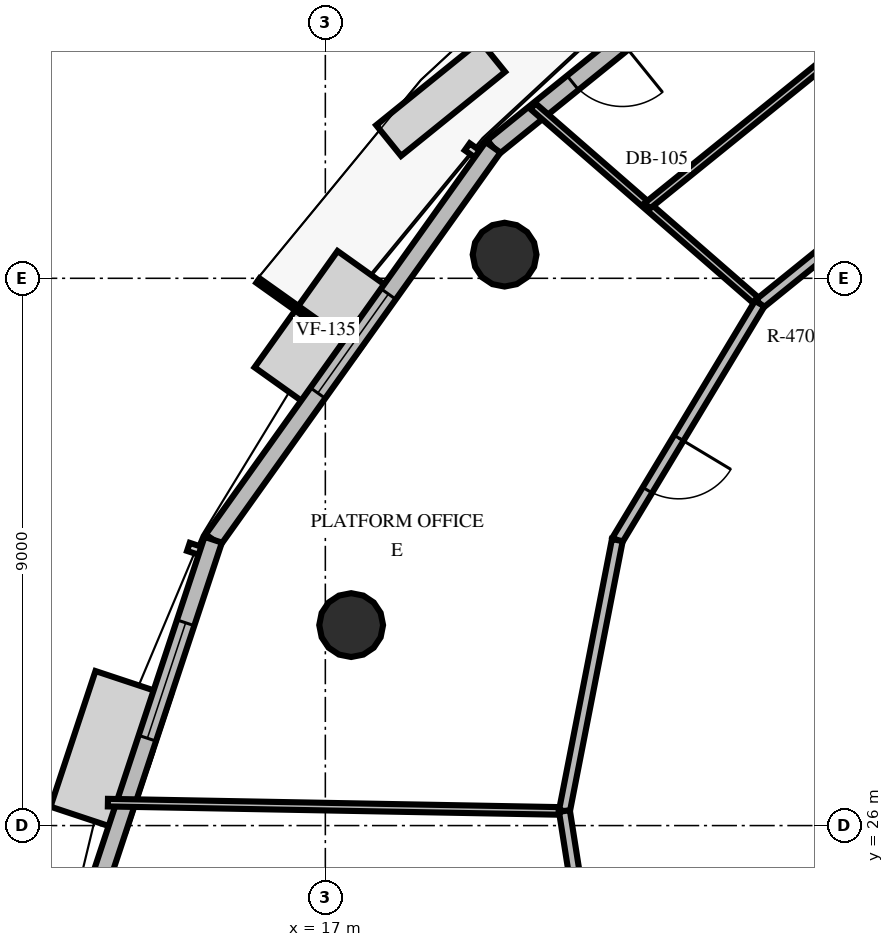
"""IFC4 building model, lengths in metres.
Left out: names, types, materials, properties, quantities, classifications, styles, units other than length and angle.
Written with IfcOpenShell. Run it as: python <this file> out.ifc"""

import sys

from ifc_helpers import new_model, si_unit, direction, frame, frame_2d, origin, origin_2d, place, context, subcontext, project, spatial, rectangle, circle, extrude, element, fill, save


model = new_model("IFC4")
c1 = context("Model", 3, precision=1e-05, world=origin(), true_north=direction((0.0, 1.0)))
c2 = subcontext(c1, "Body", "Model", "MODEL_VIEW")
j1 = project(units=[si_unit("LENGTHUNIT", "METRE"), si_unit("PLANEANGLEUNIT", "RADIAN")], contexts=[c1])
p1 = place(None, origin())
s1 = spatial("IfcSite", under=j1, at=p1, CompositionType="ELEMENT")
p2 = place(p1, origin())
s2 = spatial("IfcBuilding", under=s1, at=p2, CompositionType="ELEMENT")
p3 = place(p2, frame((0.0, 0.0, 195.2)))
s3 = spatial("IfcBuildingStorey", under=s2, at=p3, CompositionType="ELEMENT", Elevation=195.2)
for number, where, z_axis, x_axis in (
    (1, (19.948, 35.389, 0.0), (0.0, 0.0, 1.0), (1.0, 0.0, 0.0)),
    (2, (17.425, 29.297, 0.0), (0.0, 0.0, 1.0), (1.0, 0.0, 0.0)),
):
    element("IfcColumn", number, at=place(p3, frame(where, z_axis=z_axis, x_axis=x_axis)), inside=s3, PredefinedType="COLUMN", context=c2, shape_type="SweptSolid", body=[
        extrude(circle(Radius=0.525, at=origin_2d()), origin(), (0.0, 0.0, 1.0), 3.6),
    ])
p4 = place(p3, frame((26.078, 42.264, 0.0), z_axis=(0.0, 0.0, 1.0), x_axis=(-0.777687524657, -0.628651027194, 0.0)))
e3 = element("IfcWall", 3, at=p4, inside=s3, PredefinedType="SOLIDWALL", context=c2, shape_type="SweptSolid", body=[
    extrude(rectangle(XDim=8.127, YDim=0.3, at=frame_2d((4.063, 0.0))), origin(), (0.0, 0.0, 1.0), 2.66),
])
p5 = place(p4, frame((5.39, 0.0, 0.0)))
e4 = element("IfcOpeningElement", 4, at=p5, cuts=e3, PredefinedType="OPENING", context=c2, shape_type="SweptSolid", body=[
    extrude(rectangle(XDim=1.05, YDim=2.15, at=frame_2d((0.525, 1.075))), frame((0.0, 0.16, 0.0), z_axis=(0.0, -1.0, 0.0), x_axis=(1.0, 0.0, 0.0)), (0.0, 0.0, 1.0), 0.32),
])
p6 = place(p3, frame((19.758, 37.155, 0.0), z_axis=(0.0, 0.0, 1.0), x_axis=(-0.580588320106, -0.814197274963, 0.0)))
e5 = element("IfcWall", 5, at=p6, inside=s3, PredefinedType="SOLIDWALL", context=c2, shape_type="SweptSolid", body=[
    extrude(rectangle(XDim=7.927, YDim=0.3, at=frame_2d((3.963, 0.0))), origin(), (0.0, 0.0, 1.0), 2.66),
])
p7 = place(p6, frame((2.964, 0.0, 0.8)))
e6 = element("IfcOpeningElement", 6, at=p7, cuts=e5, PredefinedType="OPENING", context=c2, shape_type="SweptSolid", body=[
    extrude(rectangle(XDim=2.0, YDim=1.85, at=frame_2d((1.0, 0.925))), frame((0.0, 0.16, 0.0), z_axis=(0.0, -1.0, 0.0), x_axis=(1.0, 0.0, 0.0)), (0.0, 0.0, 1.0), 0.32),
])
p8 = place(p3, frame((15.156, 30.701, 0.0), z_axis=(0.0, 0.0, 1.0), x_axis=(-0.31491065828, -0.949121318537, 0.0)))
e7 = element("IfcWall", 7, at=p8, inside=s3, PredefinedType="SOLIDWALL", context=c2, shape_type="SweptSolid", body=[
    extrude(rectangle(XDim=7.398, YDim=0.3, at=frame_2d((3.699, 0.0))), origin(), (0.0, 0.0, 1.0), 2.66),
])
p9 = place(p8, frame((1.439, 0.0, 0.8)))
e8 = element("IfcOpeningElement", 8, at=p9, cuts=e7, PredefinedType="OPENING", context=c2, shape_type="SweptSolid", body=[
    extrude(rectangle(XDim=2.0, YDim=1.85, at=frame_2d((1.0, 0.925))), frame((0.0, 0.16, 0.0), z_axis=(0.0, -1.0, 0.0), x_axis=(1.0, 0.0, 0.0)), (0.0, 0.0, 1.0), 0.32),
])
p10 = place(p3, frame((24.143, 34.583, 0.0), z_axis=(0.0, 0.0, 1.0), x_axis=(-0.754104479033, 0.656754470638, 0.0)))
e9 = element("IfcWall", 9, at=p10, inside=s3, PredefinedType="PARTITIONING", context=c2, shape_type="SweptSolid", body=[
    extrude(rectangle(XDim=4.943, YDim=0.125, at=frame_2d((2.472, 0.0))), origin(), (0.0, 0.0, 1.0), 2.46),
])
p11 = place(p3, frame((27.674, 37.437, 0.0), z_axis=(0.0, 0.0, 1.0), x_axis=(-0.777710585506, -0.62862249816, 0.0)))
e10 = element("IfcWall", 10, at=p11, inside=s3, PredefinedType="PARTITIONING", context=c2, shape_type="SweptSolid", body=[
    extrude(rectangle(XDim=4.539, YDim=0.18, at=frame_2d((2.27, 0.0))), origin(), (0.0, 0.0, 1.0), 2.46),
])
p12 = place(p3, frame((26.488, 39.581, 0.0), z_axis=(0.0, 0.0, 1.0), x_axis=(-0.777681383414, -0.628658624288, 0.0)))
e11 = element("IfcWall", 11, at=p12, inside=s3, PredefinedType="PARTITIONING", context=c2, shape_type="SweptSolid", body=[
    extrude(rectangle(XDim=5.39, YDim=0.125, at=frame_2d((2.695, 0.0))), origin(), (0.0, 0.0, 1.0), 2.46),
])
p13 = place(p3, frame((20.932, 26.24, 0.0), z_axis=(0.0, 0.0, 1.0), x_axis=(-0.999831870586, 0.018336590739, 0.0)))
e12 = element("IfcWall", 12, at=p13, inside=s3, PredefinedType="PARTITIONING", context=c2, shape_type="SweptSolid", body=[
    extrude(rectangle(XDim=7.509, YDim=0.125, at=frame_2d((3.755, 0.0))), origin(), (0.0, 0.0, 1.0), 2.46),
])
p14 = place(p3, frame((24.143, 34.583, 0.0), z_axis=(0.0, 0.0, 1.0), x_axis=(-0.515768687054, -0.856727880633, 0.0)))
e13 = element("IfcWall", 13, at=p14, inside=s3, PredefinedType="PARTITIONING", context=c2, shape_type="SweptSolid", body=[
    extrude(rectangle(XDim=4.539, YDim=0.18, at=frame_2d((2.27, 0.0))), origin(), (0.0, 0.0, 1.0), 2.46),
])
p15 = place(p14, frame((2.579, 0.0, 0.0)))
e14 = element("IfcOpeningElement", 14, at=p15, cuts=e13, PredefinedType="OPENING", context=c2, shape_type="SweptSolid", body=[
    extrude(rectangle(XDim=1.0, YDim=2.15, at=frame_2d((0.5, 1.075))), frame((0.0, 0.1, 0.0), z_axis=(0.0, -1.0, 0.0), x_axis=(1.0, 0.0, 0.0)), (0.0, 0.0, 1.0), 0.2),
])
p16 = place(p3, frame((21.802, 30.695, 0.0), z_axis=(0.0, 0.0, 1.0), x_axis=(-0.191687274319, -0.981456055493, 0.0)))
e15 = element("IfcWall", 15, at=p16, inside=s3, PredefinedType="PARTITIONING", context=c2, shape_type="SweptSolid", body=[
    extrude(rectangle(XDim=4.539, YDim=0.18, at=frame_2d((2.27, 0.0))), origin(), (0.0, 0.0, 1.0), 2.46),
])
p17 = place(p3, frame((20.932, 26.24, 0.0), z_axis=(0.0, 0.0, 1.0), x_axis=(0.155600748133, -0.987820027728, 0.0)))
e16 = element("IfcWall", 16, at=p17, inside=s3, PredefinedType="PARTITIONING", context=c2, shape_type="SweptSolid", body=[
    extrude(rectangle(XDim=4.539, YDim=0.18, at=frame_2d((2.27, 0.0))), origin(), (0.0, 0.0, 1.0), 2.46),
])
p18 = place(p5, origin())
e17 = element("IfcDoor", 17, at=p18, inside=s3, OperationType="SINGLE_SWING_LEFT", PredefinedType="DOOR", context=c2, shape_type="SweptSolid", body=[
    extrude(rectangle(XDim=1.05, YDim=2.15, at=frame_2d((0.525, 1.075))), frame((0.0, 0.025, 0.0), z_axis=(0.0, -1.0, 0.0), x_axis=(1.0, 0.0, 0.0)), (0.0, 0.0, 1.0), 0.05),
])
fill(e4, e17)
p19 = place(p7, origin())
e18 = element("IfcWindow", 18, at=p19, inside=s3, PartitioningType="SINGLE_PANEL", PredefinedType="WINDOW", context=c2, shape_type="SweptSolid", body=[
    extrude(rectangle(XDim=2.0, YDim=1.85, at=frame_2d((1.0, 0.925))), frame((0.0, 0.03, 0.0), z_axis=(0.0, -1.0, 0.0), x_axis=(1.0, 0.0, 0.0)), (0.0, 0.0, 1.0), 0.06),
])
fill(e6, e18)
p20 = place(p9, origin())
e19 = element("IfcWindow", 19, at=p20, inside=s3, PartitioningType="SINGLE_PANEL", PredefinedType="WINDOW", context=c2, shape_type="SweptSolid", body=[
    extrude(rectangle(XDim=2.0, YDim=1.85, at=frame_2d((1.0, 0.925))), frame((0.0, 0.03, 0.0), z_axis=(0.0, -1.0, 0.0), x_axis=(1.0, 0.0, 0.0)), (0.0, 0.0, 1.0), 0.06),
])
fill(e8, e19)
p21 = place(p15, origin())
e20 = element("IfcDoor", 20, at=p21, inside=s3, OperationType="SINGLE_SWING_LEFT", PredefinedType="DOOR", context=c2, shape_type="SweptSolid", body=[
    extrude(rectangle(XDim=1.0, YDim=2.15, at=frame_2d((0.5, 1.075))), frame((0.0, 0.025, 0.0), z_axis=(0.0, -1.0, 0.0), x_axis=(1.0, 0.0, 0.0)), (0.0, 0.0, 1.0), 0.05),
])
fill(e14, e20)
save(model, sys.argv[1])
